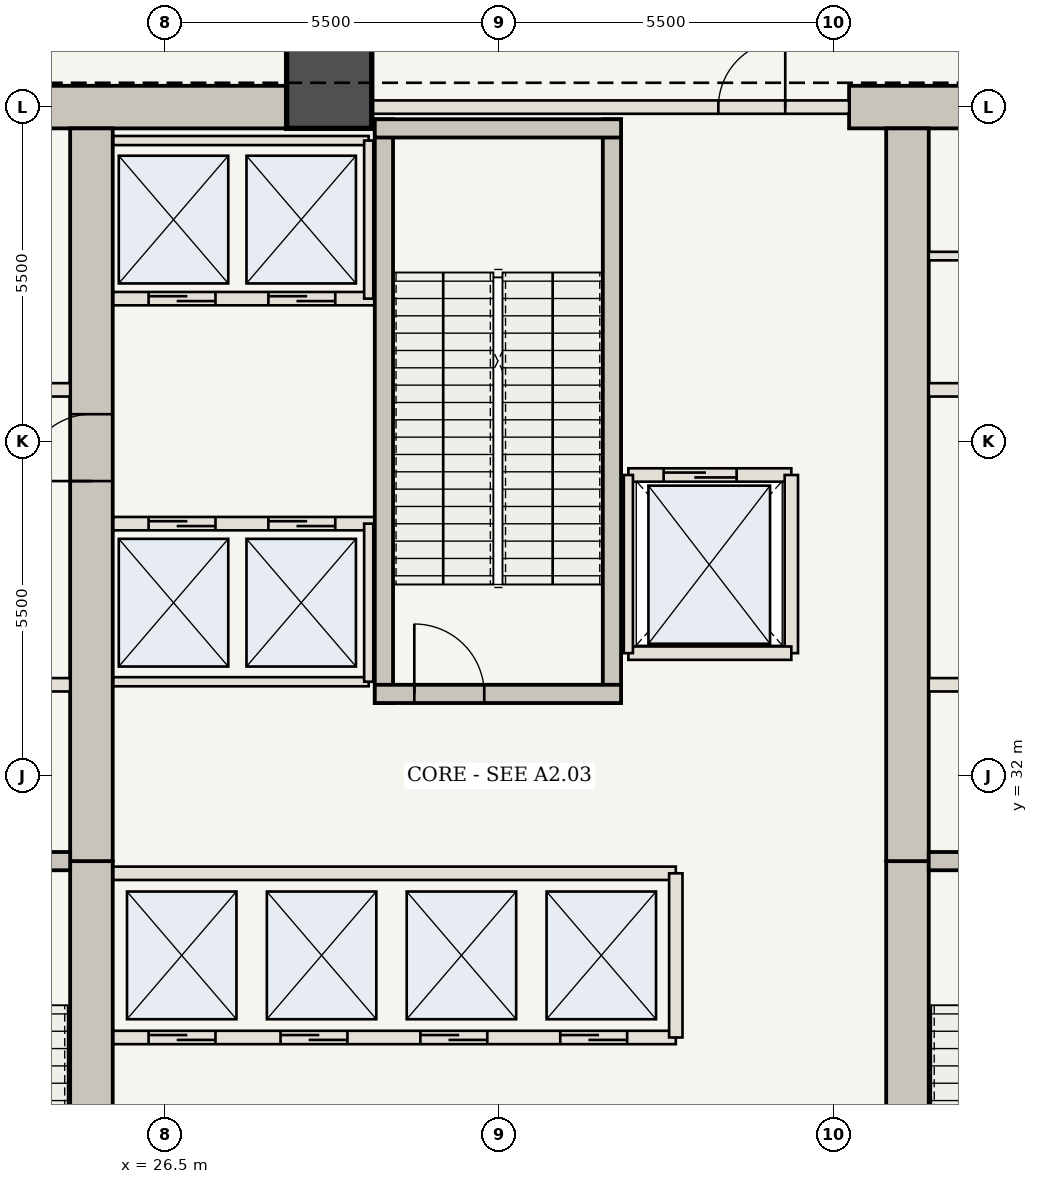
"""IFC4 building model, lengths in metres.
Left out: names, types, materials, properties, quantities, classifications, styles, units other than length and angle.
Written with IfcOpenShell. Run it as: python <this file> out.ifc"""

import sys

from ifc_helpers import new_model, si_unit, direction, frame, frame_2d, origin, origin_2d, place, context, subcontext, project, spatial, rectangle, extrude, element, fill, save


model = new_model("IFC4")
c1 = context("Model", 3, precision=1e-05, world=origin(), true_north=direction((0.0, 1.0)))
c2 = subcontext(c1, "Body", "Model", "MODEL_VIEW")
j1 = project(units=[si_unit("LENGTHUNIT", "METRE"), si_unit("PLANEANGLEUNIT", "RADIAN")], contexts=[c1])
p1 = place(None, origin())
s1 = spatial("IfcSite", under=j1, at=p1, CompositionType="ELEMENT")
p2 = place(p1, origin())
s2 = spatial("IfcBuilding", under=s1, at=p2, CompositionType="ELEMENT")
p3 = place(p2, origin())
s3 = spatial("IfcBuildingStorey", under=s2, at=p3, CompositionType="ELEMENT", Elevation=0.0)
p4 = place(p3, frame((21.41, 43.0, 0.0), z_axis=(0.0, 0.0, 1.0), x_axis=(1.0, 0.0, 0.0)))
e1 = element("IfcWall", 1, at=p4, inside=s3, PredefinedType="SHEAR", context=c2, shape_type="SweptSolid", body=[
    extrude(rectangle(XDim=8.24, YDim=0.7, at=frame_2d((4.12, 0.0))), origin(), (0.0, 0.0, 1.0), 6.65),
])
p5 = place(p3, frame((37.75, 43.0, 0.0), z_axis=(0.0, 0.0, 1.0), x_axis=(1.0, 0.0, 0.0)))
e2 = element("IfcWall", 2, at=p5, inside=s3, PredefinedType="SHEAR", context=c2, shape_type="SweptSolid", body=[
    extrude(rectangle(XDim=4.84, YDim=0.7, at=frame_2d((2.42, 0.0))), origin(), (0.0, 0.0, 1.0), 6.65),
])
p6 = place(p3, frame((25.29, 21.3, 0.0), z_axis=(0.0, 0.0, 1.0), x_axis=(0.0, 1.0, 0.0)))
e3 = element("IfcWall", 3, at=p6, inside=s3, PredefinedType="SHEAR", context=c2, shape_type="SweptSolid", body=[
    extrude(rectangle(XDim=9.3, YDim=0.7, at=frame_2d((4.65, 0.0))), origin(), (0.0, 0.0, 1.0), 6.65),
])
p7 = place(p3, frame((25.29, 30.6, 0.0), z_axis=(0.0, 0.0, 1.0), x_axis=(0.0, 1.0, 0.0)))
e4 = element("IfcWall", 4, at=p7, inside=s3, PredefinedType="SHEAR", context=c2, shape_type="SweptSolid", body=[
    extrude(rectangle(XDim=12.05, YDim=0.7, at=frame_2d((6.025, 0.0))), origin(), (0.0, 0.0, 1.0), 6.65),
])
p8 = place(p7, frame((6.25, 0.0, 0.0)))
e5 = element("IfcOpeningElement", 5, at=p8, cuts=e4, PredefinedType="OPENING", context=c2, shape_type="SweptSolid", body=[
    extrude(rectangle(XDim=1.1, YDim=2.15, at=frame_2d((0.55, 1.075))), frame((0.0, 0.36, 0.0), z_axis=(0.0, -1.0, 0.0), x_axis=(1.0, 0.0, 0.0)), (0.0, 0.0, 1.0), 0.72),
])
p9 = place(p3, frame((38.71, 21.3, 0.0), z_axis=(0.0, 0.0, 1.0), x_axis=(0.0, 1.0, 0.0)))
e6 = element("IfcWall", 6, at=p9, inside=s3, PredefinedType="SHEAR", context=c2, shape_type="SweptSolid", body=[
    extrude(rectangle(XDim=9.3, YDim=0.7, at=frame_2d((4.65, 0.0))), origin(), (0.0, 0.0, 1.0), 6.65),
])
p10 = place(p3, frame((38.71, 30.6, 0.0), z_axis=(0.0, 0.0, 1.0), x_axis=(0.0, 1.0, 0.0)))
e7 = element("IfcWall", 7, at=p10, inside=s3, PredefinedType="SHEAR", context=c2, shape_type="SweptSolid", body=[
    extrude(rectangle(XDim=12.05, YDim=0.7, at=frame_2d((6.025, 0.0))), origin(), (0.0, 0.0, 1.0), 6.65),
])
p11 = place(p3, frame((29.2, 43.35, 0.0), z_axis=(0.0, 0.0, 1.0), x_axis=(1.0, 0.0, 0.0)))
e8 = element("IfcColumn", 8, at=p11, inside=s3, PredefinedType="COLUMN", context=c2, shape_type="SweptSolid", body=[
    extrude(rectangle(XDim=1.4, YDim=1.4, at=origin_2d()), origin(), (0.0, 0.0, 1.0), 6.65),
])
for number, where, z_axis, x_axis in (
    (9, (21.41, 30.6, 0.0), (0.0, 0.0, 1.0), (1.0, 0.0, 0.0)),
    (10, (39.06, 30.6, 0.0), (0.0, 0.0, 1.0), (1.0, 0.0, 0.0)),
):
    element("IfcWall", number, at=place(p3, frame(where, z_axis=z_axis, x_axis=x_axis)), inside=s3, PredefinedType="SHEAR", context=c2, shape_type="SweptSolid", body=[
        extrude(rectangle(XDim=3.53, YDim=0.3, at=frame_2d((1.765, 0.0))), origin(), (0.0, 0.0, 1.0), 6.41),
    ])
p12 = place(p3, frame((21.41, 33.5, 0.0), z_axis=(0.0, 0.0, 1.0), x_axis=(1.0, 0.0, 0.0)))
e11 = element("IfcWall", 11, at=p12, inside=s3, PredefinedType="STANDARD", context=c2, shape_type="SweptSolid", body=[
    extrude(rectangle(XDim=3.53, YDim=0.22, at=frame_2d((1.765, 0.0))), origin(), (0.0, 0.0, 1.0), 6.41),
])
p13 = place(p12, frame((0.75, 0.0, 0.0)))
e12 = element("IfcOpeningElement", 12, at=p13, cuts=e11, PredefinedType="OPENING", context=c2, shape_type="SweptSolid", body=[
    extrude(rectangle(XDim=1.2, YDim=2.2, at=frame_2d((0.6, 1.1))), frame((0.0, 0.12, 0.0), z_axis=(0.0, -1.0, 0.0), x_axis=(1.0, 0.0, 0.0)), (0.0, 0.0, 1.0), 0.24),
])
p14 = place(p3, frame((39.06, 33.5, 0.0), z_axis=(0.0, 0.0, 1.0), x_axis=(1.0, 0.0, 0.0)))
e13 = element("IfcWall", 13, at=p14, inside=s3, PredefinedType="STANDARD", context=c2, shape_type="SweptSolid", body=[
    extrude(rectangle(XDim=3.53, YDim=0.22, at=frame_2d((1.765, 0.0))), origin(), (0.0, 0.0, 1.0), 6.41),
])
p15 = place(p14, frame((1.55, 0.0, 0.0)))
e14 = element("IfcOpeningElement", 14, at=p15, cuts=e13, PredefinedType="OPENING", context=c2, shape_type="SweptSolid", body=[
    extrude(rectangle(XDim=1.2, YDim=2.2, at=frame_2d((0.6, 1.1))), frame((0.0, 0.12, 0.0), z_axis=(0.0, -1.0, 0.0), x_axis=(1.0, 0.0, 0.0)), (0.0, 0.0, 1.0), 0.24),
])
for number, where, z_axis, x_axis in (
    (15, (21.41, 38.35, 0.0), (0.0, 0.0, 1.0), (1.0, 0.0, 0.0)),
    (16, (39.06, 38.35, 0.0), (0.0, 0.0, 1.0), (1.0, 0.0, 0.0)),
):
    element("IfcWall", number, at=place(p3, frame(where, z_axis=z_axis, x_axis=x_axis)), inside=s3, PredefinedType="STANDARD", context=c2, shape_type="SweptSolid", body=[
        extrude(rectangle(XDim=3.53, YDim=0.22, at=frame_2d((1.765, 0.0))), origin(), (0.0, 0.0, 1.0), 6.41),
    ])
p16 = place(p3, frame((39.06, 40.55, 0.0), z_axis=(0.0, 0.0, 1.0), x_axis=(1.0, 0.0, 0.0)))
e17 = element("IfcWall", 17, at=p16, inside=s3, PredefinedType="STANDARD", context=c2, shape_type="SweptSolid", body=[
    extrude(rectangle(XDim=3.53, YDim=0.14, at=frame_2d((1.765, 0.0))), origin(), (0.0, 0.0, 1.0), 6.41),
])
p17 = place(p3, frame((25.65, 27.7, 0.0), z_axis=(0.0, 0.0, 1.0), x_axis=(1.0, 0.0, 0.0)))
e18 = element("IfcWall", 18, at=p17, inside=s3, PredefinedType="STANDARD", context=c2, shape_type="SweptSolid", body=[
    extrude(rectangle(XDim=9.25, YDim=0.22, at=frame_2d((4.625, 0.0))), origin(), (0.0, 0.0, 1.0), 6.41),
])
p18 = place(p17, frame((0.58, 0.0, 0.0)))
e19 = element("IfcOpeningElement", 19, at=p18, cuts=e18, PredefinedType="OPENING", context=c2, shape_type="SweptSolid", body=[
    extrude(rectangle(XDim=1.1, YDim=2.15, at=frame_2d((0.55, 1.075))), frame((0.0, 0.12, 0.0), z_axis=(0.0, -1.0, 0.0), x_axis=(1.0, 0.0, 0.0)), (0.0, 0.0, 1.0), 0.24),
])
p19 = place(p17, frame((2.75, 0.0, 0.0)))
e20 = element("IfcOpeningElement", 20, at=p19, cuts=e18, PredefinedType="OPENING", context=c2, shape_type="SweptSolid", body=[
    extrude(rectangle(XDim=1.1, YDim=2.15, at=frame_2d((0.55, 1.075))), frame((0.0, 0.12, 0.0), z_axis=(0.0, -1.0, 0.0), x_axis=(1.0, 0.0, 0.0)), (0.0, 0.0, 1.0), 0.24),
])
p20 = place(p17, frame((5.05, 0.0, 0.0)))
e21 = element("IfcOpeningElement", 21, at=p20, cuts=e18, PredefinedType="OPENING", context=c2, shape_type="SweptSolid", body=[
    extrude(rectangle(XDim=1.1, YDim=2.15, at=frame_2d((0.55, 1.075))), frame((0.0, 0.12, 0.0), z_axis=(0.0, -1.0, 0.0), x_axis=(1.0, 0.0, 0.0)), (0.0, 0.0, 1.0), 0.24),
])
p21 = place(p17, frame((7.35, 0.0, 0.0)))
e22 = element("IfcOpeningElement", 22, at=p21, cuts=e18, PredefinedType="OPENING", context=c2, shape_type="SweptSolid", body=[
    extrude(rectangle(XDim=1.1, YDim=2.15, at=frame_2d((0.55, 1.075))), frame((0.0, 0.12, 0.0), z_axis=(0.0, -1.0, 0.0), x_axis=(1.0, 0.0, 0.0)), (0.0, 0.0, 1.0), 0.24),
])
p22 = place(p3, frame((25.65, 30.4, 0.0), z_axis=(0.0, 0.0, 1.0), x_axis=(1.0, 0.0, 0.0)))
e23 = element("IfcWall", 23, at=p22, inside=s3, PredefinedType="STANDARD", context=c2, shape_type="SweptSolid", body=[
    extrude(rectangle(XDim=9.25, YDim=0.22, at=frame_2d((4.625, 0.0))), origin(), (0.0, 0.0, 1.0), 6.41),
])
p23 = place(p3, frame((34.9, 27.7, 0.0), z_axis=(0.0, 0.0, 1.0), x_axis=(0.0, 1.0, 0.0)))
e24 = element("IfcWall", 24, at=p23, inside=s3, PredefinedType="STANDARD", context=c2, shape_type="SweptSolid", body=[
    extrude(rectangle(XDim=2.7, YDim=0.22, at=frame_2d((1.35, 0.0))), origin(), (0.0, 0.0, 1.0), 6.41),
])
p24 = place(p3, frame((25.65, 36.15, 0.0), z_axis=(0.0, 0.0, 1.0), x_axis=(1.0, 0.0, 0.0)))
e25 = element("IfcWall", 25, at=p24, inside=s3, PredefinedType="STANDARD", context=c2, shape_type="SweptSolid", body=[
    extrude(rectangle(XDim=4.3, YDim=0.22, at=frame_2d((2.15, 0.0))), origin(), (0.0, 0.0, 1.0), 6.41),
])
p25 = place(p24, frame((0.58, 0.0, 0.0)))
e26 = element("IfcOpeningElement", 26, at=p25, cuts=e25, PredefinedType="OPENING", context=c2, shape_type="SweptSolid", body=[
    extrude(rectangle(XDim=1.1, YDim=2.15, at=frame_2d((0.55, 1.075))), frame((0.0, 0.12, 0.0), z_axis=(0.0, -1.0, 0.0), x_axis=(1.0, 0.0, 0.0)), (0.0, 0.0, 1.0), 0.24),
])
p26 = place(p24, frame((2.55, 0.0, 0.0)))
e27 = element("IfcOpeningElement", 27, at=p26, cuts=e25, PredefinedType="OPENING", context=c2, shape_type="SweptSolid", body=[
    extrude(rectangle(XDim=1.1, YDim=2.15, at=frame_2d((0.55, 1.075))), frame((0.0, 0.12, 0.0), z_axis=(0.0, -1.0, 0.0), x_axis=(1.0, 0.0, 0.0)), (0.0, 0.0, 1.0), 0.24),
])
p27 = place(p3, frame((25.65, 33.55, 0.0), z_axis=(0.0, 0.0, 1.0), x_axis=(1.0, 0.0, 0.0)))
e28 = element("IfcWall", 28, at=p27, inside=s3, PredefinedType="STANDARD", context=c2, shape_type="SweptSolid", body=[
    extrude(rectangle(XDim=4.2, YDim=0.15, at=frame_2d((2.1, 0.0))), origin(), (0.0, 0.0, 1.0), 6.41),
])
p28 = place(p3, frame((29.85, 33.55, 0.0), z_axis=(0.0, 0.0, 1.0), x_axis=(0.0, 1.0, 0.0)))
e29 = element("IfcWall", 29, at=p28, inside=s3, PredefinedType="STANDARD", context=c2, shape_type="SweptSolid", body=[
    extrude(rectangle(XDim=2.6, YDim=0.15, at=frame_2d((1.3, 0.0))), origin(), (0.0, 0.0, 1.0), 6.41),
])
p29 = place(p3, frame((25.65, 39.85, 0.0), z_axis=(0.0, 0.0, 1.0), x_axis=(1.0, 0.0, 0.0)))
e30 = element("IfcWall", 30, at=p29, inside=s3, PredefinedType="STANDARD", context=c2, shape_type="SweptSolid", body=[
    extrude(rectangle(XDim=4.3, YDim=0.22, at=frame_2d((2.15, 0.0))), origin(), (0.0, 0.0, 1.0), 6.41),
])
p30 = place(p29, frame((0.58, 0.0, 0.0)))
e31 = element("IfcOpeningElement", 31, at=p30, cuts=e30, PredefinedType="OPENING", context=c2, shape_type="SweptSolid", body=[
    extrude(rectangle(XDim=1.1, YDim=2.15, at=frame_2d((0.55, 1.075))), frame((0.0, 0.12, 0.0), z_axis=(0.0, -1.0, 0.0), x_axis=(1.0, 0.0, 0.0)), (0.0, 0.0, 1.0), 0.24),
])
p31 = place(p29, frame((2.55, 0.0, 0.0)))
e32 = element("IfcOpeningElement", 32, at=p31, cuts=e30, PredefinedType="OPENING", context=c2, shape_type="SweptSolid", body=[
    extrude(rectangle(XDim=1.1, YDim=2.15, at=frame_2d((0.55, 1.075))), frame((0.0, 0.12, 0.0), z_axis=(0.0, -1.0, 0.0), x_axis=(1.0, 0.0, 0.0)), (0.0, 0.0, 1.0), 0.24),
])
p32 = place(p3, frame((25.65, 42.45, 0.0), z_axis=(0.0, 0.0, 1.0), x_axis=(1.0, 0.0, 0.0)))
e33 = element("IfcWall", 33, at=p32, inside=s3, PredefinedType="STANDARD", context=c2, shape_type="SweptSolid", body=[
    extrude(rectangle(XDim=4.2, YDim=0.15, at=frame_2d((2.1, 0.0))), origin(), (0.0, 0.0, 1.0), 6.41),
])
p33 = place(p3, frame((29.85, 39.85, 0.0), z_axis=(0.0, 0.0, 1.0), x_axis=(0.0, 1.0, 0.0)))
e34 = element("IfcWall", 34, at=p33, inside=s3, PredefinedType="STANDARD", context=c2, shape_type="SweptSolid", body=[
    extrude(rectangle(XDim=2.6, YDim=0.15, at=frame_2d((1.3, 0.0))), origin(), (0.0, 0.0, 1.0), 6.41),
])
for number, where, z_axis, x_axis in (
    (35, (30.1, 33.2, 0.0), (0.0, 0.0, 1.0), (0.0, 1.0, 0.0)),
    (36, (33.85, 33.2, 0.0), (0.0, 0.0, 1.0), (0.0, 1.0, 0.0)),
):
    element("IfcWall", number, at=place(p3, frame(where, z_axis=z_axis, x_axis=x_axis)), inside=s3, PredefinedType="SHEAR", context=c2, shape_type="SweptSolid", body=[
        extrude(rectangle(XDim=9.6, YDim=0.3, at=frame_2d((4.8, 0.0))), origin(), (0.0, 0.0, 1.0), 6.41),
    ])
p34 = place(p3, frame((29.95, 33.35, 0.0), z_axis=(0.0, 0.0, 1.0), x_axis=(1.0, 0.0, 0.0)))
e37 = element("IfcWall", 37, at=p34, inside=s3, PredefinedType="SHEAR", context=c2, shape_type="SweptSolid", body=[
    extrude(rectangle(XDim=4.05, YDim=0.3, at=frame_2d((2.025, 0.0))), origin(), (0.0, 0.0, 1.0), 6.41),
])
p35 = place(p34, frame((0.65, 0.0, 0.0)))
e38 = element("IfcOpeningElement", 38, at=p35, cuts=e37, PredefinedType="OPENING", context=c2, shape_type="SweptSolid", body=[
    extrude(rectangle(XDim=1.15, YDim=2.15, at=frame_2d((0.575, 1.075))), frame((0.0, 0.16, 0.0), z_axis=(0.0, -1.0, 0.0), x_axis=(1.0, 0.0, 0.0)), (0.0, 0.0, 1.0), 0.32),
])
p36 = place(p3, frame((29.95, 42.65, 0.0), z_axis=(0.0, 0.0, 1.0), x_axis=(1.0, 0.0, 0.0)))
e39 = element("IfcWall", 39, at=p36, inside=s3, PredefinedType="SHEAR", context=c2, shape_type="SweptSolid", body=[
    extrude(rectangle(XDim=4.05, YDim=0.3, at=frame_2d((2.025, 0.0))), origin(), (0.0, 0.0, 1.0), 6.41),
])
p37 = place(p3, frame((29.65, 43.0, 0.0), z_axis=(0.0, 0.0, 1.0), x_axis=(1.0, 0.0, 0.0)))
e40 = element("IfcWall", 40, at=p37, inside=s3, PredefinedType="STANDARD", context=c2, shape_type="SweptSolid", body=[
    extrude(rectangle(XDim=8.1, YDim=0.22, at=frame_2d((4.05, 0.0))), origin(), (0.0, 0.0, 1.0), 6.41),
])
p38 = place(p37, frame((5.95, 0.0, 0.0)))
e41 = element("IfcOpeningElement", 41, at=p38, cuts=e40, PredefinedType="OPENING", context=c2, shape_type="SweptSolid", body=[
    extrude(rectangle(XDim=1.1, YDim=2.15, at=frame_2d((0.55, 1.075))), frame((0.0, 0.12, 0.0), z_axis=(0.0, -1.0, 0.0), x_axis=(1.0, 0.0, 0.0)), (0.0, 0.0, 1.0), 0.24),
])
p39 = place(p3, frame((34.12, 36.95, 0.0), z_axis=(0.0, 0.0, 1.0), x_axis=(1.0, 0.0, 0.0)))
e42 = element("IfcWall", 42, at=p39, inside=s3, PredefinedType="STANDARD", context=c2, shape_type="SweptSolid", body=[
    extrude(rectangle(XDim=2.68, YDim=0.22, at=frame_2d((1.34, 0.0))), origin(), (0.0, 0.0, 1.0), 6.41),
])
p40 = place(p39, frame((0.58, 0.0, 0.0)))
e43 = element("IfcOpeningElement", 43, at=p40, cuts=e42, PredefinedType="OPENING", context=c2, shape_type="SweptSolid", body=[
    extrude(rectangle(XDim=1.2, YDim=2.2, at=frame_2d((0.6, 1.1))), frame((0.0, 0.12, 0.0), z_axis=(0.0, -1.0, 0.0), x_axis=(1.0, 0.0, 0.0)), (0.0, 0.0, 1.0), 0.24),
])
p41 = place(p3, frame((36.8, 34.02, 0.0), z_axis=(0.0, 0.0, 1.0), x_axis=(0.0, 1.0, 0.0)))
e44 = element("IfcWall", 44, at=p41, inside=s3, PredefinedType="STANDARD", context=c2, shape_type="SweptSolid", body=[
    extrude(rectangle(XDim=2.93, YDim=0.22, at=frame_2d((1.465, 0.0))), origin(), (0.0, 0.0, 1.0), 6.41),
])
p42 = place(p3, frame((34.12, 34.02, 0.0), z_axis=(0.0, 0.0, 1.0), x_axis=(1.0, 0.0, 0.0)))
e45 = element("IfcWall", 45, at=p42, inside=s3, PredefinedType="STANDARD", context=c2, shape_type="SweptSolid", body=[
    extrude(rectangle(XDim=2.68, YDim=0.22, at=frame_2d((1.34, 0.0))), origin(), (0.0, 0.0, 1.0), 6.41),
])
p43 = place(p3, frame((34.12, 34.02, 0.0), z_axis=(0.0, 0.0, 1.0), x_axis=(0.0, 1.0, 0.0)))
e46 = element("IfcWall", 46, at=p43, inside=s3, PredefinedType="STANDARD", context=c2, shape_type="SweptSolid", body=[
    extrude(rectangle(XDim=2.93, YDim=0.15, at=frame_2d((1.465, 0.0))), origin(), (0.0, 0.0, 1.0), 6.41),
])
p44 = place(p8, origin())
e47 = element("IfcDoor", 47, at=p44, inside=s3, OperationType="SINGLE_SWING_LEFT", PredefinedType="DOOR", context=c2, shape_type="SweptSolid", body=[
    extrude(rectangle(XDim=1.1, YDim=2.15, at=frame_2d((0.55, 1.075))), frame((0.0, 0.025, 0.0), z_axis=(0.0, -1.0, 0.0), x_axis=(1.0, 0.0, 0.0)), (0.0, 0.0, 1.0), 0.05),
])
fill(e5, e47)
p45 = place(p18, origin())
e48 = element("IfcDoor", 48, at=p45, inside=s3, OperationType="DOUBLE_DOOR_SLIDING", PredefinedType="DOOR", context=c2, shape_type="SweptSolid", body=[
    extrude(rectangle(XDim=1.1, YDim=2.15, at=frame_2d((0.55, 1.075))), frame((0.0, 0.025, 0.0), z_axis=(0.0, -1.0, 0.0), x_axis=(1.0, 0.0, 0.0)), (0.0, 0.0, 1.0), 0.05),
])
fill(e19, e48)
p46 = place(p19, origin())
e49 = element("IfcDoor", 49, at=p46, inside=s3, OperationType="DOUBLE_DOOR_SLIDING", PredefinedType="DOOR", context=c2, shape_type="SweptSolid", body=[
    extrude(rectangle(XDim=1.1, YDim=2.15, at=frame_2d((0.55, 1.075))), frame((0.0, 0.025, 0.0), z_axis=(0.0, -1.0, 0.0), x_axis=(1.0, 0.0, 0.0)), (0.0, 0.0, 1.0), 0.05),
])
fill(e20, e49)
p47 = place(p20, origin())
e50 = element("IfcDoor", 50, at=p47, inside=s3, OperationType="DOUBLE_DOOR_SLIDING", PredefinedType="DOOR", context=c2, shape_type="SweptSolid", body=[
    extrude(rectangle(XDim=1.1, YDim=2.15, at=frame_2d((0.55, 1.075))), frame((0.0, 0.025, 0.0), z_axis=(0.0, -1.0, 0.0), x_axis=(1.0, 0.0, 0.0)), (0.0, 0.0, 1.0), 0.05),
])
fill(e21, e50)
p48 = place(p21, origin())
e51 = element("IfcDoor", 51, at=p48, inside=s3, OperationType="DOUBLE_DOOR_SLIDING", PredefinedType="DOOR", context=c2, shape_type="SweptSolid", body=[
    extrude(rectangle(XDim=1.1, YDim=2.15, at=frame_2d((0.55, 1.075))), frame((0.0, 0.025, 0.0), z_axis=(0.0, -1.0, 0.0), x_axis=(1.0, 0.0, 0.0)), (0.0, 0.0, 1.0), 0.05),
])
fill(e22, e51)
p49 = place(p25, origin())
e52 = element("IfcDoor", 52, at=p49, inside=s3, OperationType="DOUBLE_DOOR_SLIDING", PredefinedType="DOOR", context=c2, shape_type="SweptSolid", body=[
    extrude(rectangle(XDim=1.1, YDim=2.15, at=frame_2d((0.55, 1.075))), frame((0.0, 0.025, 0.0), z_axis=(0.0, -1.0, 0.0), x_axis=(1.0, 0.0, 0.0)), (0.0, 0.0, 1.0), 0.05),
])
fill(e26, e52)
p50 = place(p26, origin())
e53 = element("IfcDoor", 53, at=p50, inside=s3, OperationType="DOUBLE_DOOR_SLIDING", PredefinedType="DOOR", context=c2, shape_type="SweptSolid", body=[
    extrude(rectangle(XDim=1.1, YDim=2.15, at=frame_2d((0.55, 1.075))), frame((0.0, 0.025, 0.0), z_axis=(0.0, -1.0, 0.0), x_axis=(1.0, 0.0, 0.0)), (0.0, 0.0, 1.0), 0.05),
])
fill(e27, e53)
p51 = place(p30, origin())
e54 = element("IfcDoor", 54, at=p51, inside=s3, OperationType="DOUBLE_DOOR_SLIDING", PredefinedType="DOOR", context=c2, shape_type="SweptSolid", body=[
    extrude(rectangle(XDim=1.1, YDim=2.15, at=frame_2d((0.55, 1.075))), frame((0.0, 0.025, 0.0), z_axis=(0.0, -1.0, 0.0), x_axis=(1.0, 0.0, 0.0)), (0.0, 0.0, 1.0), 0.05),
])
fill(e31, e54)
p52 = place(p31, origin())
e55 = element("IfcDoor", 55, at=p52, inside=s3, OperationType="DOUBLE_DOOR_SLIDING", PredefinedType="DOOR", context=c2, shape_type="SweptSolid", body=[
    extrude(rectangle(XDim=1.1, YDim=2.15, at=frame_2d((0.55, 1.075))), frame((0.0, 0.025, 0.0), z_axis=(0.0, -1.0, 0.0), x_axis=(1.0, 0.0, 0.0)), (0.0, 0.0, 1.0), 0.05),
])
fill(e32, e55)
p53 = place(p35, origin())
e56 = element("IfcDoor", 56, at=p53, inside=s3, OperationType="SINGLE_SWING_LEFT", PredefinedType="DOOR", context=c2, shape_type="SweptSolid", body=[
    extrude(rectangle(XDim=1.15, YDim=2.15, at=frame_2d((0.575, 1.075))), frame((0.0, 0.025, 0.0), z_axis=(0.0, -1.0, 0.0), x_axis=(1.0, 0.0, 0.0)), (0.0, 0.0, 1.0), 0.05),
])
fill(e38, e56)
p54 = place(p38, origin())
e57 = element("IfcDoor", 57, at=p54, inside=s3, OperationType="SINGLE_SWING_RIGHT", PredefinedType="DOOR", context=c2, shape_type="SweptSolid", body=[
    extrude(rectangle(XDim=1.1, YDim=2.15, at=frame_2d((0.55, 1.075))), frame((0.0, 0.025, 0.0), z_axis=(0.0, -1.0, 0.0), x_axis=(1.0, 0.0, 0.0)), (0.0, 0.0, 1.0), 0.05),
])
fill(e41, e57)
p55 = place(p40, origin())
e58 = element("IfcDoor", 58, at=p55, inside=s3, OperationType="DOUBLE_DOOR_SLIDING", PredefinedType="DOOR", context=c2, shape_type="SweptSolid", body=[
    extrude(rectangle(XDim=1.2, YDim=2.2, at=frame_2d((0.6, 1.1))), frame((0.0, 0.025, 0.0), z_axis=(0.0, -1.0, 0.0), x_axis=(1.0, 0.0, 0.0)), (0.0, 0.0, 1.0), 0.05),
])
fill(e43, e58)
save(model, sys.argv[1])
